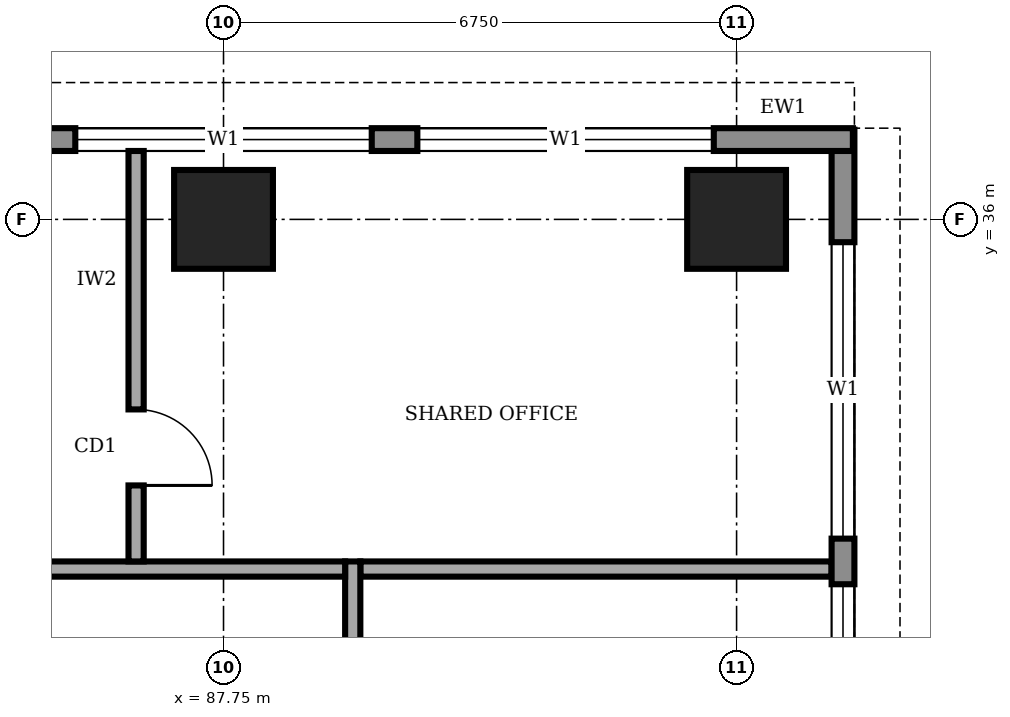
"""IFC4 building model, lengths in metres.
Left out: names, types, materials, properties, quantities, classifications, styles, units other than length and angle.
Written with IfcOpenShell. Run it as: python <this file> out.ifc"""

import sys

from ifc_helpers import new_model, si_unit, direction, frame, frame_2d, origin, origin_2d, place, context, subcontext, project, spatial, rectangle, extrude, element, fill, save


model = new_model("IFC4")
c1 = context("Model", 3, precision=1e-05, world=origin(), true_north=direction((0.0, 1.0)))
c2 = subcontext(c1, "Body", "Model", "MODEL_VIEW")
j1 = project(units=[si_unit("LENGTHUNIT", "METRE"), si_unit("PLANEANGLEUNIT", "RADIAN")], contexts=[c1])
p1 = place(None, origin())
s1 = spatial("IfcSite", under=j1, at=p1, CompositionType="ELEMENT")
p2 = place(p1, origin())
s2 = spatial("IfcBuilding", under=s1, at=p2, CompositionType="ELEMENT")
p3 = place(p2, frame((0.0, 0.0, 209.0)))
s3 = spatial("IfcBuildingStorey", under=s2, at=p3, CompositionType="ELEMENT", Elevation=209.0)
for number, where, z_axis, x_axis in (
    (1, (87.75, 36.0, 0.0), (0.0, 0.0, 1.0), (1.0, 0.0, 0.0)),
    (2, (94.5, 36.0, 0.0), (0.0, 0.0, 1.0), (1.0, 0.0, 0.0)),
):
    element("IfcColumn", number, at=place(p3, frame(where, z_axis=z_axis, x_axis=x_axis)), inside=s3, PredefinedType="COLUMN", context=c2, shape_type="SweptSolid", body=[
        extrude(rectangle(XDim=1.3, YDim=1.3, at=origin_2d()), origin(), (0.0, 0.0, 1.0), 4.0),
    ])
p4 = place(p3, frame((95.9, 3.32, 0.0), z_axis=(0.0, 0.0, 1.0), x_axis=(0.0, 1.0, 0.0)))
e3 = element("IfcWall", 3, at=p4, inside=s3, PredefinedType="STANDARD", context=c2, shape_type="SweptSolid", body=[
    extrude(rectangle(XDim=33.86, YDim=0.3, at=frame_2d((16.93, 0.0))), origin(), (0.0, 0.0, 1.0), 3.75),
])
p5 = place(p4, frame((1.48, 0.0, 0.9)))
e4 = element("IfcOpeningElement", 4, at=p5, cuts=e3, PredefinedType="OPENING", context=c2, shape_type="SweptSolid", body=[
    extrude(rectangle(XDim=3.9, YDim=2.2, at=frame_2d((1.95, 1.1))), frame((0.0, 0.16, 0.0), z_axis=(0.0, -1.0, 0.0), x_axis=(1.0, 0.0, 0.0)), (0.0, 0.0, 1.0), 0.32),
])
p6 = place(p4, frame((5.98, 0.0, 0.9)))
e5 = element("IfcOpeningElement", 5, at=p6, cuts=e3, PredefinedType="OPENING", context=c2, shape_type="SweptSolid", body=[
    extrude(rectangle(XDim=3.9, YDim=2.2, at=frame_2d((1.95, 1.1))), frame((0.0, 0.16, 0.0), z_axis=(0.0, -1.0, 0.0), x_axis=(1.0, 0.0, 0.0)), (0.0, 0.0, 1.0), 0.32),
])
p7 = place(p4, frame((10.48, 0.0, 0.9)))
e6 = element("IfcOpeningElement", 6, at=p7, cuts=e3, PredefinedType="OPENING", context=c2, shape_type="SweptSolid", body=[
    extrude(rectangle(XDim=3.9, YDim=2.2, at=frame_2d((1.95, 1.1))), frame((0.0, 0.16, 0.0), z_axis=(0.0, -1.0, 0.0), x_axis=(1.0, 0.0, 0.0)), (0.0, 0.0, 1.0), 0.32),
])
p8 = place(p4, frame((14.98, 0.0, 0.9)))
e7 = element("IfcOpeningElement", 7, at=p8, cuts=e3, PredefinedType="OPENING", context=c2, shape_type="SweptSolid", body=[
    extrude(rectangle(XDim=3.9, YDim=2.2, at=frame_2d((1.95, 1.1))), frame((0.0, 0.16, 0.0), z_axis=(0.0, -1.0, 0.0), x_axis=(1.0, 0.0, 0.0)), (0.0, 0.0, 1.0), 0.32),
])
p9 = place(p4, frame((19.48, 0.0, 0.9)))
e8 = element("IfcOpeningElement", 8, at=p9, cuts=e3, PredefinedType="OPENING", context=c2, shape_type="SweptSolid", body=[
    extrude(rectangle(XDim=3.9, YDim=2.2, at=frame_2d((1.95, 1.1))), frame((0.0, 0.16, 0.0), z_axis=(0.0, -1.0, 0.0), x_axis=(1.0, 0.0, 0.0)), (0.0, 0.0, 1.0), 0.32),
])
p10 = place(p4, frame((23.98, 0.0, 0.9)))
e9 = element("IfcOpeningElement", 9, at=p10, cuts=e3, PredefinedType="OPENING", context=c2, shape_type="SweptSolid", body=[
    extrude(rectangle(XDim=3.9, YDim=2.2, at=frame_2d((1.95, 1.1))), frame((0.0, 0.16, 0.0), z_axis=(0.0, -1.0, 0.0), x_axis=(1.0, 0.0, 0.0)), (0.0, 0.0, 1.0), 0.32),
])
p11 = place(p4, frame((28.48, 0.0, 0.9)))
e10 = element("IfcOpeningElement", 10, at=p11, cuts=e3, PredefinedType="OPENING", context=c2, shape_type="SweptSolid", body=[
    extrude(rectangle(XDim=3.9, YDim=2.2, at=frame_2d((1.95, 1.1))), frame((0.0, 0.16, 0.0), z_axis=(0.0, -1.0, 0.0), x_axis=(1.0, 0.0, 0.0)), (0.0, 0.0, 1.0), 0.32),
])
p12 = place(p3, frame((96.03, 37.05, 0.0), z_axis=(0.0, 0.0, 1.0), x_axis=(-1.0, 0.0, 0.0)))
e11 = element("IfcWall", 11, at=p12, inside=s3, PredefinedType="STANDARD", context=c2, shape_type="SweptSolid", body=[
    extrude(rectangle(XDim=29.91, YDim=0.3, at=frame_2d((14.955, 0.0))), origin(), (0.0, 0.0, 1.0), 3.75),
])
p13 = place(p12, frame((24.33, 0.0, 0.9)))
e12 = element("IfcOpeningElement", 12, at=p13, cuts=e11, PredefinedType="OPENING", context=c2, shape_type="SweptSolid", body=[
    extrude(rectangle(XDim=3.9, YDim=2.2, at=frame_2d((1.95, 1.1))), frame((0.0, 0.16, 0.0), z_axis=(0.0, -1.0, 0.0), x_axis=(1.0, 0.0, 0.0)), (0.0, 0.0, 1.0), 0.32),
])
p14 = place(p12, frame((19.83, 0.0, 0.9)))
e13 = element("IfcOpeningElement", 13, at=p14, cuts=e11, PredefinedType="OPENING", context=c2, shape_type="SweptSolid", body=[
    extrude(rectangle(XDim=3.9, YDim=2.2, at=frame_2d((1.95, 1.1))), frame((0.0, 0.16, 0.0), z_axis=(0.0, -1.0, 0.0), x_axis=(1.0, 0.0, 0.0)), (0.0, 0.0, 1.0), 0.32),
])
p15 = place(p12, frame((15.33, 0.0, 0.9)))
e14 = element("IfcOpeningElement", 14, at=p15, cuts=e11, PredefinedType="OPENING", context=c2, shape_type="SweptSolid", body=[
    extrude(rectangle(XDim=3.9, YDim=2.2, at=frame_2d((1.95, 1.1))), frame((0.0, 0.16, 0.0), z_axis=(0.0, -1.0, 0.0), x_axis=(1.0, 0.0, 0.0)), (0.0, 0.0, 1.0), 0.32),
])
p16 = place(p12, frame((10.83, 0.0, 0.9)))
e15 = element("IfcOpeningElement", 15, at=p16, cuts=e11, PredefinedType="OPENING", context=c2, shape_type="SweptSolid", body=[
    extrude(rectangle(XDim=3.9, YDim=2.2, at=frame_2d((1.95, 1.1))), frame((0.0, 0.16, 0.0), z_axis=(0.0, -1.0, 0.0), x_axis=(1.0, 0.0, 0.0)), (0.0, 0.0, 1.0), 0.32),
])
p17 = place(p12, frame((6.33, 0.0, 0.9)))
e16 = element("IfcOpeningElement", 16, at=p17, cuts=e11, PredefinedType="OPENING", context=c2, shape_type="SweptSolid", body=[
    extrude(rectangle(XDim=3.9, YDim=2.2, at=frame_2d((1.95, 1.1))), frame((0.0, 0.16, 0.0), z_axis=(0.0, -1.0, 0.0), x_axis=(1.0, 0.0, 0.0)), (0.0, 0.0, 1.0), 0.32),
])
p18 = place(p12, frame((1.83, 0.0, 0.9)))
e17 = element("IfcOpeningElement", 17, at=p18, cuts=e11, PredefinedType="OPENING", context=c2, shape_type="SweptSolid", body=[
    extrude(rectangle(XDim=3.9, YDim=2.2, at=frame_2d((1.95, 1.1))), frame((0.0, 0.16, 0.0), z_axis=(0.0, -1.0, 0.0), x_axis=(1.0, 0.0, 0.0)), (0.0, 0.0, 1.0), 0.32),
])
p19 = place(p3, frame((89.45, 7.7, 0.0), z_axis=(0.0, 0.0, 1.0), x_axis=(0.0, 1.0, 0.0)))
e18 = element("IfcWall", 18, at=p19, inside=s3, PredefinedType="SOLIDWALL", context=c2, shape_type="SweptSolid", body=[
    extrude(rectangle(XDim=23.8, YDim=0.2, at=frame_2d((11.9, 0.0))), origin(), (0.0, 0.0, 1.0), 3.75),
])
p20 = place(p19, frame((2.3, 0.0, 0.0)))
e19 = element("IfcOpeningElement", 19, at=p20, cuts=e18, PredefinedType="OPENING", context=c2, shape_type="SweptSolid", body=[
    extrude(rectangle(XDim=1.0, YDim=2.1, at=frame_2d((0.5, 1.05))), frame((0.0, 0.11, 0.0), z_axis=(0.0, -1.0, 0.0), x_axis=(1.0, 0.0, 0.0)), (0.0, 0.0, 1.0), 0.22),
])
p21 = place(p19, frame((7.05, 0.0, 0.0)))
e20 = element("IfcOpeningElement", 20, at=p21, cuts=e18, PredefinedType="OPENING", context=c2, shape_type="SweptSolid", body=[
    extrude(rectangle(XDim=0.9, YDim=2.1, at=frame_2d((0.45, 1.05))), frame((0.0, 0.11, 0.0), z_axis=(0.0, -1.0, 0.0), x_axis=(1.0, 0.0, 0.0)), (0.0, 0.0, 1.0), 0.22),
])
p22 = place(p19, frame((11.85, 0.0, 0.0)))
e21 = element("IfcOpeningElement", 21, at=p22, cuts=e18, PredefinedType="OPENING", context=c2, shape_type="SweptSolid", body=[
    extrude(rectangle(XDim=0.9, YDim=2.1, at=frame_2d((0.45, 1.05))), frame((0.0, 0.11, 0.0), z_axis=(0.0, -1.0, 0.0), x_axis=(1.0, 0.0, 0.0)), (0.0, 0.0, 1.0), 0.22),
])
p23 = place(p19, frame((14.9, 0.0, 0.0)))
e22 = element("IfcOpeningElement", 22, at=p23, cuts=e18, PredefinedType="OPENING", context=c2, shape_type="SweptSolid", body=[
    extrude(rectangle(XDim=0.9, YDim=2.1, at=frame_2d((0.45, 1.05))), frame((0.0, 0.11, 0.0), z_axis=(0.0, -1.0, 0.0), x_axis=(1.0, 0.0, 0.0)), (0.0, 0.0, 1.0), 0.22),
])
p24 = place(p19, frame((17.8, 0.0, 0.0)))
e23 = element("IfcOpeningElement", 23, at=p24, cuts=e18, PredefinedType="OPENING", context=c2, shape_type="SweptSolid", body=[
    extrude(rectangle(XDim=1.0, YDim=2.1, at=frame_2d((0.5, 1.05))), frame((0.0, 0.11, 0.0), z_axis=(0.0, -1.0, 0.0), x_axis=(1.0, 0.0, 0.0)), (0.0, 0.0, 1.0), 0.22),
])
p25 = place(p19, frame((9.7, 0.0, 0.0)))
e24 = element("IfcOpeningElement", 24, at=p25, cuts=e18, PredefinedType="OPENING", context=c2, shape_type="SweptSolid", body=[
    extrude(rectangle(XDim=1.0, YDim=2.1, at=frame_2d((0.5, 1.05))), frame((0.0, 0.11, 0.0), z_axis=(0.0, -1.0, 0.0), x_axis=(1.0, 0.0, 0.0)), (0.0, 0.0, 1.0), 0.22),
])
p26 = place(p19, frame((21.05, 0.0, 0.0)))
e25 = element("IfcOpeningElement", 25, at=p26, cuts=e18, PredefinedType="OPENING", context=c2, shape_type="SweptSolid", body=[
    extrude(rectangle(XDim=1.0, YDim=2.1, at=frame_2d((0.5, 1.05))), frame((0.0, 0.11, 0.0), z_axis=(0.0, -1.0, 0.0), x_axis=(1.0, 0.0, 0.0)), (0.0, 0.0, 1.0), 0.22),
])
p27 = place(p3, frame((89.35, 31.4, 0.0), z_axis=(0.0, 0.0, 1.0), x_axis=(-1.0, 0.0, 0.0)))
e26 = element("IfcWall", 26, at=p27, inside=s3, PredefinedType="SOLIDWALL", context=c2, shape_type="SweptSolid", body=[
    extrude(rectangle(XDim=16.9, YDim=0.2, at=frame_2d((8.45, 0.0))), origin(), (0.0, 0.0, 1.0), 3.75),
])
p28 = place(p27, frame((14.375, 0.0, 0.0)))
e27 = element("IfcOpeningElement", 27, at=p28, cuts=e26, PredefinedType="OPENING", context=c2, shape_type="SweptSolid", body=[
    extrude(rectangle(XDim=1.0, YDim=2.1, at=frame_2d((0.5, 1.05))), frame((0.0, 0.11, 0.0), z_axis=(0.0, -1.0, 0.0), x_axis=(1.0, 0.0, 0.0)), (0.0, 0.0, 1.0), 0.22),
])
p29 = place(p27, frame((10.1, 0.0, 0.0)))
e28 = element("IfcOpeningElement", 28, at=p29, cuts=e26, PredefinedType="OPENING", context=c2, shape_type="SweptSolid", body=[
    extrude(rectangle(XDim=1.0, YDim=2.1, at=frame_2d((0.5, 1.05))), frame((0.0, 0.11, 0.0), z_axis=(0.0, -1.0, 0.0), x_axis=(1.0, 0.0, 0.0)), (0.0, 0.0, 1.0), 0.22),
])
p30 = place(p3, frame((86.6, 36.9, 0.0), z_axis=(0.0, 0.0, 1.0), x_axis=(0.0, -1.0, 0.0)))
e29 = element("IfcWall", 29, at=p30, inside=s3, PredefinedType="SOLIDWALL", context=c2, shape_type="SweptSolid", body=[
    extrude(rectangle(XDim=5.4, YDim=0.2, at=frame_2d((2.7, 0.0))), origin(), (0.0, 0.0, 1.0), 3.75),
])
p31 = place(p30, frame((3.4, 0.0, 0.0)))
e30 = element("IfcOpeningElement", 30, at=p31, cuts=e29, PredefinedType="OPENING", context=c2, shape_type="SweptSolid", body=[
    extrude(rectangle(XDim=1.0, YDim=2.1, at=frame_2d((0.5, 1.05))), frame((0.0, 0.11, 0.0), z_axis=(0.0, -1.0, 0.0), x_axis=(1.0, 0.0, 0.0)), (0.0, 0.0, 1.0), 0.22),
])
p32 = place(p3, frame((89.55, 31.4, 0.0), z_axis=(0.0, 0.0, 1.0), x_axis=(1.0, 0.0, 0.0)))
e31 = element("IfcWall", 31, at=p32, inside=s3, PredefinedType="SOLIDWALL", context=c2, shape_type="SweptSolid", body=[
    extrude(rectangle(XDim=6.2, YDim=0.2, at=frame_2d((3.1, 0.0))), origin(), (0.0, 0.0, 1.0), 3.75),
])
p33 = place(p10, origin())
e32 = element("IfcWindow", 32, at=p33, inside=s3, PartitioningType="SINGLE_PANEL", PredefinedType="WINDOW", context=c2, shape_type="SweptSolid", body=[
    extrude(rectangle(XDim=3.9, YDim=2.2, at=frame_2d((1.95, 1.1))), frame((0.0, 0.03, 0.0), z_axis=(0.0, -1.0, 0.0), x_axis=(1.0, 0.0, 0.0)), (0.0, 0.0, 1.0), 0.06),
])
fill(e9, e32)
p34 = place(p11, origin())
e33 = element("IfcWindow", 33, at=p34, inside=s3, PartitioningType="SINGLE_PANEL", PredefinedType="WINDOW", context=c2, shape_type="SweptSolid", body=[
    extrude(rectangle(XDim=3.9, YDim=2.2, at=frame_2d((1.95, 1.1))), frame((0.0, 0.03, 0.0), z_axis=(0.0, -1.0, 0.0), x_axis=(1.0, 0.0, 0.0)), (0.0, 0.0, 1.0), 0.06),
])
fill(e10, e33)
p35 = place(p17, origin())
e34 = element("IfcWindow", 34, at=p35, inside=s3, PartitioningType="SINGLE_PANEL", PredefinedType="WINDOW", context=c2, shape_type="SweptSolid", body=[
    extrude(rectangle(XDim=3.9, YDim=2.2, at=frame_2d((1.95, 1.1))), frame((0.0, 0.03, 0.0), z_axis=(0.0, -1.0, 0.0), x_axis=(1.0, 0.0, 0.0)), (0.0, 0.0, 1.0), 0.06),
])
fill(e16, e34)
p36 = place(p18, origin())
e35 = element("IfcWindow", 35, at=p36, inside=s3, PartitioningType="SINGLE_PANEL", PredefinedType="WINDOW", context=c2, shape_type="SweptSolid", body=[
    extrude(rectangle(XDim=3.9, YDim=2.2, at=frame_2d((1.95, 1.1))), frame((0.0, 0.03, 0.0), z_axis=(0.0, -1.0, 0.0), x_axis=(1.0, 0.0, 0.0)), (0.0, 0.0, 1.0), 0.06),
])
fill(e17, e35)
p37 = place(p31, origin())
e36 = element("IfcDoor", 36, at=p37, inside=s3, OperationType="SINGLE_SWING_RIGHT", PredefinedType="DOOR", context=c2, shape_type="SweptSolid", body=[
    extrude(rectangle(XDim=1.0, YDim=2.1, at=frame_2d((0.5, 1.05))), frame((0.0, 0.025, 0.0), z_axis=(0.0, -1.0, 0.0), x_axis=(1.0, 0.0, 0.0)), (0.0, 0.0, 1.0), 0.05),
])
fill(e30, e36)
save(model, sys.argv[1])
